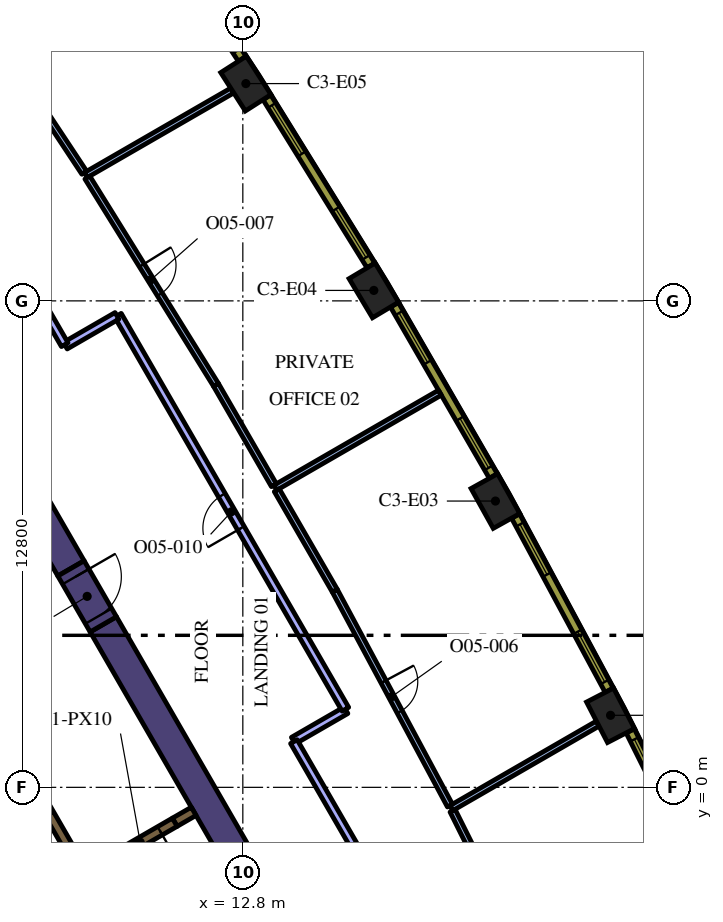
"""IFC4 building model, lengths in metres.
Left out: names, types, materials, properties, quantities, classifications, styles, units other than length and angle.
Written with IfcOpenShell. Run it as: python <this file> out.ifc"""

import sys

from ifc_helpers import new_model, si_unit, direction, frame, frame_2d, origin, origin_2d, place, context, subcontext, project, spatial, rectangle, extrude, element, fill, save


model = new_model("IFC4")
c1 = context("Model", 3, precision=1e-05, world=origin(), true_north=direction((0.0, 1.0)))
c2 = subcontext(c1, "Body", "Model", "MODEL_VIEW")
j1 = project(units=[si_unit("LENGTHUNIT", "METRE"), si_unit("PLANEANGLEUNIT", "RADIAN")], contexts=[c1])
p1 = place(None, origin())
s1 = spatial("IfcSite", under=j1, at=p1, CompositionType="ELEMENT")
p2 = place(p1, origin())
s2 = spatial("IfcBuilding", under=s1, at=p2, CompositionType="ELEMENT")
p3 = place(p2, frame((0.0, 0.0, 192.0)))
s3 = spatial("IfcBuildingStorey", under=s2, at=p3, CompositionType="ELEMENT", Elevation=192.0)
for number, where, z_axis, x_axis in (
    (1, (22.476, 1.896, 0.0), (0.0, 0.0, 1.0), (-0.46, 0.888, 0.0)),
    (2, (19.447, 7.533, 0.0), (0.0, 0.0, 1.0), (-0.487, 0.874, 0.0)),
    (3, (16.247, 13.075, 0.0), (0.0, 0.0, 1.0), (-0.513, 0.858, 0.0)),
    (4, (12.88, 18.517, 0.0), (0.0, 0.0, 1.0), (-0.539, 0.842, 0.0)),
):
    element("IfcColumn", number, at=place(p3, frame(where, z_axis=z_axis, x_axis=x_axis)), inside=s3, PredefinedType="COLUMN", context=c2, shape_type="SweptSolid", body=[
        extrude(rectangle(XDim=1.2, YDim=0.8, at=origin_2d()), origin(), (0.0, 0.0, 1.0), 4.2),
    ])
p4 = place(p3, frame((9.129, 4.289, 0.0), z_axis=(0.0, 0.0, 1.0), x_axis=(0.499995742806, -0.866027861663, 0.0)))
e5 = element("IfcWall", 5, at=p4, inside=s3, PredefinedType="SOLIDWALL", context=c2, shape_type="SweptSolid", body=[
    extrude(rectangle(XDim=12.527, YDim=0.8, at=frame_2d((6.264, 0.0))), origin(), (0.0, 0.0, 1.0), 4.2),
])
p5 = place(p3, frame((8.279, 5.761, 0.0), z_axis=(0.0, 0.0, 1.0), x_axis=(-0.500010359015, 0.866019422922, 0.0)))
e6 = element("IfcWall", 6, at=p5, inside=s3, PredefinedType="SOLIDWALL", context=c2, shape_type="SweptSolid", body=[
    extrude(rectangle(XDim=12.528, YDim=0.8, at=frame_2d((6.264, 0.0))), origin(), (0.0, 0.0, 1.0), 4.2),
])
p6 = place(p3, frame((11.507, -0.631, 0.0), z_axis=(0.0, 0.0, 1.0), x_axis=(-0.866093731455, -0.499881634324, 0.0)))
e7 = element("IfcWall", 7, at=p6, inside=s3, PredefinedType="SOLIDWALL", context=c2, shape_type="SweptSolid", body=[
    extrude(rectangle(XDim=0.575, YDim=0.25, at=frame_2d((0.288, 0.0))), origin(), (0.0, 0.0, 1.0), 4.2),
])
p7 = place(p3, frame((8.565, -2.185, 0.0), z_axis=(0.0, 0.0, 1.0), x_axis=(-0.499997954832, 0.866026584559, 0.0)))
e8 = element("IfcWall", 8, at=p7, inside=s3, PredefinedType="SOLIDWALL", context=c2, shape_type="SweptSolid", body=[
    extrude(rectangle(XDim=12.35, YDim=0.25, at=frame_2d((6.175, 0.0))), origin(), (0.0, 0.0, 1.0), 4.2),
])
p8 = place(p7, frame((0.585, 0.0, 0.0)))
e9 = element("IfcOpeningElement", 9, at=p8, cuts=e8, PredefinedType="OPENING", context=c2, shape_type="SweptSolid", body=[
    extrude(rectangle(XDim=1.1, YDim=2.1, at=frame_2d((0.55, 1.05))), frame((0.0, 0.135, 0.0), z_axis=(0.0, -1.0, 0.0), x_axis=(1.0, 0.0, 0.0)), (0.0, 0.0, 1.0), 0.27),
])
p9 = place(p3, frame((11.009, -0.919, 0.0), z_axis=(0.0, 0.0, 1.0), x_axis=(-0.866059744384, -0.49994051562, 0.0)))
e10 = element("IfcWall", 10, at=p9, inside=s3, PredefinedType="SOLIDWALL", context=c2, shape_type="SweptSolid", body=[
    extrude(rectangle(XDim=2.1, YDim=0.25, at=frame_2d((1.05, 0.0))), origin(), (0.0, 0.0, 1.0), 4.2),
])
p10 = place(p9, frame((0.45, 0.0, 0.0)))
e11 = element("IfcOpeningElement", 11, at=p10, cuts=e10, PredefinedType="OPENING", context=c2, shape_type="SweptSolid", body=[
    extrude(rectangle(XDim=1.2, YDim=2.1, at=frame_2d((0.6, 1.05))), frame((0.0, 0.135, 0.0), z_axis=(0.0, -1.0, 0.0), x_axis=(1.0, 0.0, 0.0)), (0.0, 0.0, 1.0), 0.27),
])
p11 = place(p3, frame((8.279, 5.761, 0.0), z_axis=(0.0, 0.0, 1.0), x_axis=(0.500062241894, -0.865989465428, 0.0)))
e12 = element("IfcWall", 12, at=p11, inside=s3, PredefinedType="SOLIDWALL", context=c2, shape_type="SweptSolid", body=[
    extrude(rectangle(XDim=1.7, YDim=0.8, at=frame_2d((0.85, 0.0))), origin(), (0.0, 0.0, 1.0), 4.2),
])
p12 = place(p11, frame((0.25, 0.0, 0.0)))
e13 = element("IfcOpeningElement", 13, at=p12, cuts=e12, PredefinedType="OPENING", context=c2, shape_type="SweptSolid", body=[
    extrude(rectangle(XDim=1.2, YDim=2.1, at=frame_2d((0.6, 1.05))), frame((0.0, 0.41, 0.0), z_axis=(0.0, -1.0, 0.0), x_axis=(1.0, 0.0, 0.0)), (0.0, 0.0, 1.0), 0.82),
])
p13 = place(p3, frame((18.286, -0.547, 0.0), z_axis=(0.0, 0.0, 1.0), x_axis=(0.866043033223, 0.499969463673, 0.0)))
e14 = element("IfcWall", 14, at=p13, inside=s3, PredefinedType="PARTITIONING", context=c2, shape_type="SweptSolid", body=[
    extrude(rectangle(XDim=4.449, YDim=0.15, at=frame_2d((2.225, 0.0))), origin(), (0.0, 0.0, 1.0), 3.1),
])
p14 = place(p3, frame((18.32, -0.615, 0.0), z_axis=(0.0, 0.0, 1.0), x_axis=(0.446258864447, -0.894903919928, 0.0)))
e15 = element("IfcWall", 15, at=p14, inside=s3, PredefinedType="PARTITIONING", context=c2, shape_type="SweptSolid", body=[
    extrude(rectangle(XDim=5.934, YDim=0.15, at=frame_2d((2.967, 0.0))), origin(), (0.0, 0.0, 1.0), 3.1),
])
p15 = place(p14, frame((2.534, 0.0, 0.0)))
e16 = element("IfcOpeningElement", 16, at=p15, cuts=e15, PredefinedType="OPENING", context=c2, shape_type="SweptSolid", body=[
    extrude(rectangle(XDim=0.9, YDim=2.1, at=frame_2d((0.45, 1.05))), frame((0.0, 0.085, 0.0), z_axis=(0.0, -1.0, 0.0), x_axis=(1.0, 0.0, 0.0)), (0.0, 0.0, 1.0), 0.17),
])
p16 = place(p3, frame((13.656, 7.884, 0.0), z_axis=(0.0, 0.0, 1.0), x_axis=(0.866022959057, 0.500004234368, 0.0)))
e17 = element("IfcWall", 17, at=p16, inside=s3, PredefinedType="PARTITIONING", context=c2, shape_type="SweptSolid", body=[
    extrude(rectangle(XDim=5.0, YDim=0.15, at=frame_2d((2.5, 0.0))), origin(), (0.0, 0.0, 1.0), 3.1),
])
p17 = place(p3, frame((15.219, 5.177, 0.0), z_axis=(0.0, 0.0, 1.0), x_axis=(0.472318506028, -0.881427948765, 0.0)))
e18 = element("IfcWall", 18, at=p17, inside=s3, PredefinedType="PARTITIONING", context=c2, shape_type="SweptSolid", body=[
    extrude(rectangle(XDim=6.419, YDim=0.15, at=frame_2d((3.21, 0.0))), origin(), (0.0, 0.0, 1.0), 3.1),
])
p18 = place(p17, frame((2.719, 0.0, 0.0)))
e19 = element("IfcOpeningElement", 19, at=p18, cuts=e18, PredefinedType="OPENING", context=c2, shape_type="SweptSolid", body=[
    extrude(rectangle(XDim=0.9, YDim=2.1, at=frame_2d((0.45, 1.05))), frame((0.0, 0.085, 0.0), z_axis=(0.0, -1.0, 0.0), x_axis=(1.0, 0.0, 0.0)), (0.0, 0.0, 1.0), 0.17),
])
p19 = place(p3, frame((15.219, 5.177, 0.0), z_axis=(0.0, 0.0, 1.0), x_axis=(-0.500054937028, 0.865993683553, 0.0)))
e20 = element("IfcWall", 20, at=p19, inside=s3, PredefinedType="PARTITIONING", context=c2, shape_type="SweptSolid", body=[
    extrude(rectangle(XDim=3.051, YDim=0.15, at=frame_2d((1.525, 0.0))), origin(), (0.0, 0.0, 1.0), 3.1),
])
p20 = place(p3, frame((8.669, 16.11, 0.0), z_axis=(0.0, 0.0, 1.0), x_axis=(0.866019272134, 0.50001062018, 0.0)))
e21 = element("IfcWall", 21, at=p20, inside=s3, PredefinedType="PARTITIONING", context=c2, shape_type="SweptSolid", body=[
    extrude(rectangle(XDim=4.449, YDim=0.15, at=frame_2d((2.225, 0.0))), origin(), (0.0, 0.0, 1.0), 3.1),
])
p21 = place(p3, frame((13.618, 7.949, 0.0), z_axis=(0.0, 0.0, 1.0), x_axis=(-0.499994921628, 0.866028335764, 0.0)))
e22 = element("IfcWall", 22, at=p21, inside=s3, PredefinedType="PARTITIONING", context=c2, shape_type="SweptSolid", body=[
    extrude(rectangle(XDim=3.051, YDim=0.15, at=frame_2d((1.525, 0.0))), origin(), (0.0, 0.0, 1.0), 3.1),
])
p22 = place(p3, frame((8.708, 16.046, 0.0), z_axis=(0.0, 0.0, 1.0), x_axis=(0.527179193015, -0.849754140003, 0.0)))
e23 = element("IfcWall", 23, at=p22, inside=s3, PredefinedType="PARTITIONING", context=c2, shape_type="SweptSolid", body=[
    extrude(rectangle(XDim=6.42, YDim=0.15, at=frame_2d((3.21, 0.0))), origin(), (0.0, 0.0, 1.0), 3.1),
])
p23 = place(p22, frame((2.719, 0.0, 0.0)))
e24 = element("IfcOpeningElement", 24, at=p23, cuts=e23, PredefinedType="OPENING", context=c2, shape_type="SweptSolid", body=[
    extrude(rectangle(XDim=0.9, YDim=2.1, at=frame_2d((0.45, 1.05))), frame((0.0, 0.085, 0.0), z_axis=(0.0, -1.0, 0.0), x_axis=(1.0, 0.0, 0.0)), (0.0, 0.0, 1.0), 0.17),
])
p24 = place(p3, frame((5.352, 21.121, 0.0), z_axis=(0.0, 0.0, 1.0), x_axis=(0.551896352686, -0.833912714792, 0.0)))
e25 = element("IfcWall", 25, at=p24, inside=s3, PredefinedType="PARTITIONING", context=c2, shape_type="SweptSolid", body=[
    extrude(rectangle(XDim=5.934, YDim=0.15, at=frame_2d((2.967, 0.0))), origin(), (0.0, 0.0, 1.0), 3.1),
])
p25 = place(p24, frame((2.534, 0.0, 0.0)))
e26 = element("IfcOpeningElement", 26, at=p25, cuts=e25, PredefinedType="OPENING", context=c2, shape_type="SweptSolid", body=[
    extrude(rectangle(XDim=0.9, YDim=2.1, at=frame_2d((0.45, 1.05))), frame((0.0, 0.085, 0.0), z_axis=(0.0, -1.0, 0.0), x_axis=(1.0, 0.0, 0.0)), (0.0, 0.0, 1.0), 0.17),
])
p26 = place(p3, frame((14.128, 1.229, 0.0), z_axis=(0.0, 0.0, 1.0), x_axis=(0.866028054938, 0.499995408039, 0.0)))
e27 = element("IfcWall", 27, at=p26, inside=s3, PredefinedType="PARTITIONING", context=c2, shape_type="SweptSolid", body=[
    extrude(rectangle(XDim=1.6, YDim=0.2, at=frame_2d((0.8, 0.0))), origin(), (0.0, 0.0, 1.0), 3.1),
])
p27 = place(p3, frame((15.499, 2.055, 0.0), z_axis=(0.0, 0.0, 1.0), x_axis=(-0.499986694938, 0.866033085329, 0.0)))
e28 = element("IfcWall", 28, at=p27, inside=s3, PredefinedType="PARTITIONING", context=c2, shape_type="SweptSolid", body=[
    extrude(rectangle(XDim=11.97, YDim=0.2, at=frame_2d((5.985, 0.0))), origin(), (0.0, 0.0, 1.0), 3.1),
])
p28 = place(p27, frame((5.5, 0.0, 0.0)))
e29 = element("IfcOpeningElement", 29, at=p28, cuts=e28, PredefinedType="OPENING", context=c2, shape_type="SweptSolid", body=[
    extrude(rectangle(XDim=1.0, YDim=2.1, at=frame_2d((0.5, 1.05))), frame((0.0, 0.11, 0.0), z_axis=(0.0, -1.0, 0.0), x_axis=(1.0, 0.0, 0.0)), (0.0, 0.0, 1.0), 0.22),
])
p29 = place(p3, frame((9.488, 12.406, 0.0), z_axis=(0.0, 0.0, 1.0), x_axis=(-0.865975818674, -0.500085874098, 0.0)))
e30 = element("IfcWall", 30, at=p29, inside=s3, PredefinedType="PARTITIONING", context=c2, shape_type="SweptSolid", body=[
    extrude(rectangle(XDim=1.57, YDim=0.2, at=frame_2d((0.785, 0.0))), origin(), (0.0, 0.0, 1.0), 3.1),
])
p30 = place(p3, frame((8.113, 11.647, 0.0), z_axis=(0.0, 0.0, 1.0), x_axis=(-0.500001933108, 0.866024287701, 0.0)))
e31 = element("IfcWall", 31, at=p30, inside=s3, PredefinedType="PARTITIONING", context=c2, shape_type="SweptSolid", body=[
    extrude(rectangle(XDim=8.721, YDim=0.2, at=frame_2d((4.361, 0.0))), origin(), (0.0, 0.0, 1.0), 3.1),
])
p31 = place(p3, frame((18.489, -6.324, 0.0), z_axis=(0.0, 0.0, 1.0), x_axis=(-0.500006134913, 0.866021861762, 0.0)))
e32 = element("IfcWall", 32, at=p31, inside=s3, PredefinedType="PARTITIONING", context=c2, shape_type="SweptSolid", body=[
    extrude(rectangle(XDim=8.691, YDim=0.2, at=frame_2d((4.346, 0.0))), origin(), (0.0, 0.0, 1.0), 3.1),
])
p32 = place(p3, frame((25.316, -3.171, 0.0), z_axis=(0.0, 0.0, 1.0), x_axis=(-0.446256171312, 0.8949052629, 0.0)))
e33 = element("IfcWall", 33, at=p32, inside=s3, PredefinedType="SOLIDWALL", context=c2, shape_type="SweptSolid", body=[
    extrude(rectangle(XDim=5.203, YDim=0.24, at=frame_2d((2.602, 0.0))), origin(), (0.0, 0.0, 1.0), 3.9),
])
p33 = place(p32, frame((0.248, 0.0, 0.9)))
e34 = element("IfcOpeningElement", 34, at=p33, cuts=e33, PredefinedType="OPENING", context=c2, shape_type="SweptSolid", body=[
    extrude(rectangle(XDim=1.5, YDim=2.55, at=frame_2d((0.75, 1.275))), frame((0.0, 0.13, 0.0), z_axis=(0.0, -1.0, 0.0), x_axis=(1.0, 0.0, 0.0)), (0.0, 0.0, 1.0), 0.26),
])
p34 = place(p32, frame((3.455, 0.0, 0.9)))
e35 = element("IfcOpeningElement", 35, at=p34, cuts=e33, PredefinedType="OPENING", context=c2, shape_type="SweptSolid", body=[
    extrude(rectangle(XDim=1.5, YDim=2.55, at=frame_2d((0.75, 1.275))), frame((0.0, 0.13, 0.0), z_axis=(0.0, -1.0, 0.0), x_axis=(1.0, 0.0, 0.0)), (0.0, 0.0, 1.0), 0.26),
])
p35 = place(p3, frame((22.44, 2.555, 0.0), z_axis=(0.0, 0.0, 1.0), x_axis=(-0.473349833294, 0.880874528704, 0.0)))
e36 = element("IfcWall", 36, at=p35, inside=s3, PredefinedType="SOLIDWALL", context=c2, shape_type="SweptSolid", body=[
    extrude(rectangle(XDim=5.204, YDim=0.24, at=frame_2d((2.602, 0.0))), origin(), (0.0, 0.0, 1.0), 3.9),
])
p36 = place(p35, frame((0.248, 0.0, 0.9)))
e37 = element("IfcOpeningElement", 37, at=p36, cuts=e36, PredefinedType="OPENING", context=c2, shape_type="SweptSolid", body=[
    extrude(rectangle(XDim=1.5, YDim=2.55, at=frame_2d((0.75, 1.275))), frame((0.0, 0.13, 0.0), z_axis=(0.0, -1.0, 0.0), x_axis=(1.0, 0.0, 0.0)), (0.0, 0.0, 1.0), 0.26),
])
p37 = place(p35, frame((3.455, 0.0, 0.9)))
e38 = element("IfcOpeningElement", 38, at=p37, cuts=e36, PredefinedType="OPENING", context=c2, shape_type="SweptSolid", body=[
    extrude(rectangle(XDim=1.5, YDim=2.55, at=frame_2d((0.75, 1.275))), frame((0.0, 0.13, 0.0), z_axis=(0.0, -1.0, 0.0), x_axis=(1.0, 0.0, 0.0)), (0.0, 0.0, 1.0), 0.26),
])
p38 = place(p3, frame((19.391, 8.191, 0.0), z_axis=(0.0, 0.0, 1.0), x_axis=(-0.500009456303, 0.866019944116, 0.0)))
e39 = element("IfcWall", 39, at=p38, inside=s3, PredefinedType="SOLIDWALL", context=c2, shape_type="SweptSolid", body=[
    extrude(rectangle(XDim=5.204, YDim=0.24, at=frame_2d((2.602, 0.0))), origin(), (0.0, 0.0, 1.0), 3.9),
])
p39 = place(p38, frame((0.248, 0.0, 0.9)))
e40 = element("IfcOpeningElement", 40, at=p39, cuts=e39, PredefinedType="OPENING", context=c2, shape_type="SweptSolid", body=[
    extrude(rectangle(XDim=1.5, YDim=2.55, at=frame_2d((0.75, 1.275))), frame((0.0, 0.13, 0.0), z_axis=(0.0, -1.0, 0.0), x_axis=(1.0, 0.0, 0.0)), (0.0, 0.0, 1.0), 0.26),
])
p40 = place(p38, frame((3.455, 0.0, 0.9)))
e41 = element("IfcOpeningElement", 41, at=p40, cuts=e39, PredefinedType="OPENING", context=c2, shape_type="SweptSolid", body=[
    extrude(rectangle(XDim=1.5, YDim=2.55, at=frame_2d((0.75, 1.275))), frame((0.0, 0.13, 0.0), z_axis=(0.0, -1.0, 0.0), x_axis=(1.0, 0.0, 0.0)), (0.0, 0.0, 1.0), 0.26),
])
p41 = place(p3, frame((16.171, 13.731, 0.0), z_axis=(0.0, 0.0, 1.0), x_axis=(-0.526197926587, 0.850362124072, 0.0)))
e42 = element("IfcWall", 42, at=p41, inside=s3, PredefinedType="SOLIDWALL", context=c2, shape_type="SweptSolid", body=[
    extrude(rectangle(XDim=5.203, YDim=0.24, at=frame_2d((2.602, 0.0))), origin(), (0.0, 0.0, 1.0), 3.9),
])
p42 = place(p41, frame((0.248, 0.0, 0.9)))
e43 = element("IfcOpeningElement", 43, at=p42, cuts=e42, PredefinedType="OPENING", context=c2, shape_type="SweptSolid", body=[
    extrude(rectangle(XDim=1.5, YDim=2.55, at=frame_2d((0.75, 1.275))), frame((0.0, 0.13, 0.0), z_axis=(0.0, -1.0, 0.0), x_axis=(1.0, 0.0, 0.0)), (0.0, 0.0, 1.0), 0.26),
])
p43 = place(p41, frame((3.455, 0.0, 0.9)))
e44 = element("IfcOpeningElement", 44, at=p43, cuts=e42, PredefinedType="OPENING", context=c2, shape_type="SweptSolid", body=[
    extrude(rectangle(XDim=1.5, YDim=2.55, at=frame_2d((0.75, 1.275))), frame((0.0, 0.13, 0.0), z_axis=(0.0, -1.0, 0.0), x_axis=(1.0, 0.0, 0.0)), (0.0, 0.0, 1.0), 0.26),
])
p44 = place(p3, frame((12.783, 19.171, 0.0), z_axis=(0.0, 0.0, 1.0), x_axis=(-0.551892811511, 0.833915058386, 0.0)))
e45 = element("IfcWall", 45, at=p44, inside=s3, PredefinedType="SOLIDWALL", context=c2, shape_type="SweptSolid", body=[
    extrude(rectangle(XDim=5.204, YDim=0.24, at=frame_2d((2.602, 0.0))), origin(), (0.0, 0.0, 1.0), 3.9),
])
p45 = place(p44, frame((0.248, 0.0, 0.9)))
e46 = element("IfcOpeningElement", 46, at=p45, cuts=e45, PredefinedType="OPENING", context=c2, shape_type="SweptSolid", body=[
    extrude(rectangle(XDim=1.5, YDim=2.55, at=frame_2d((0.75, 1.275))), frame((0.0, 0.13, 0.0), z_axis=(0.0, -1.0, 0.0), x_axis=(1.0, 0.0, 0.0)), (0.0, 0.0, 1.0), 0.26),
])
p46 = place(p44, frame((3.455, 0.0, 0.9)))
e47 = element("IfcOpeningElement", 47, at=p46, cuts=e45, PredefinedType="OPENING", context=c2, shape_type="SweptSolid", body=[
    extrude(rectangle(XDim=1.5, YDim=2.55, at=frame_2d((0.75, 1.275))), frame((0.0, 0.13, 0.0), z_axis=(0.0, -1.0, 0.0), x_axis=(1.0, 0.0, 0.0)), (0.0, 0.0, 1.0), 0.26),
])
p47 = place(p8, origin())
e48 = element("IfcDoor", 48, at=p47, inside=s3, OperationType="DOUBLE_DOOR_SLIDING", PredefinedType="DOOR", context=c2, shape_type="SweptSolid", body=[
    extrude(rectangle(XDim=1.1, YDim=2.1, at=frame_2d((0.55, 1.05))), frame((0.0, 0.025, 0.0), z_axis=(0.0, -1.0, 0.0), x_axis=(1.0, 0.0, 0.0)), (0.0, 0.0, 1.0), 0.05),
])
fill(e9, e48)
p48 = place(p10, origin())
e49 = element("IfcDoor", 49, at=p48, inside=s3, OperationType="SINGLE_SWING_LEFT", PredefinedType="DOOR", context=c2, shape_type="SweptSolid", body=[
    extrude(rectangle(XDim=1.2, YDim=2.1, at=frame_2d((0.6, 1.05))), frame((0.0, 0.025, 0.0), z_axis=(0.0, -1.0, 0.0), x_axis=(1.0, 0.0, 0.0)), (0.0, 0.0, 1.0), 0.05),
])
fill(e11, e49)
p49 = place(p12, origin())
e50 = element("IfcDoor", 50, at=p49, inside=s3, OperationType="SINGLE_SWING_LEFT", PredefinedType="DOOR", context=c2, shape_type="SweptSolid", body=[
    extrude(rectangle(XDim=1.2, YDim=2.1, at=frame_2d((0.6, 1.05))), frame((0.0, 0.025, 0.0), z_axis=(0.0, -1.0, 0.0), x_axis=(1.0, 0.0, 0.0)), (0.0, 0.0, 1.0), 0.05),
])
fill(e13, e50)
p50 = place(p18, origin())
e51 = element("IfcDoor", 51, at=p50, inside=s3, OperationType="SINGLE_SWING_LEFT", PredefinedType="DOOR", context=c2, shape_type="SweptSolid", body=[
    extrude(rectangle(XDim=0.9, YDim=2.1, at=frame_2d((0.45, 1.05))), frame((0.0, 0.025, 0.0), z_axis=(0.0, -1.0, 0.0), x_axis=(1.0, 0.0, 0.0)), (0.0, 0.0, 1.0), 0.05),
])
fill(e19, e51)
p51 = place(p23, origin())
e52 = element("IfcDoor", 52, at=p51, inside=s3, OperationType="SINGLE_SWING_LEFT", PredefinedType="DOOR", context=c2, shape_type="SweptSolid", body=[
    extrude(rectangle(XDim=0.9, YDim=2.1, at=frame_2d((0.45, 1.05))), frame((0.0, 0.025, 0.0), z_axis=(0.0, -1.0, 0.0), x_axis=(1.0, 0.0, 0.0)), (0.0, 0.0, 1.0), 0.05),
])
fill(e24, e52)
p52 = place(p28, origin())
e53 = element("IfcDoor", 53, at=p52, inside=s3, OperationType="SINGLE_SWING_RIGHT", PredefinedType="DOOR", context=c2, shape_type="SweptSolid", body=[
    extrude(rectangle(XDim=1.0, YDim=2.1, at=frame_2d((0.5, 1.05))), frame((0.0, 0.025, 0.0), z_axis=(0.0, -1.0, 0.0), x_axis=(1.0, 0.0, 0.0)), (0.0, 0.0, 1.0), 0.05),
])
fill(e29, e53)
p53 = place(p34, origin())
e54 = element("IfcWindow", 54, at=p53, inside=s3, PartitioningType="SINGLE_PANEL", PredefinedType="WINDOW", context=c2, shape_type="SweptSolid", body=[
    extrude(rectangle(XDim=1.5, YDim=2.55, at=frame_2d((0.75, 1.275))), frame((0.0, 0.04, 0.0), z_axis=(0.0, -1.0, 0.0), x_axis=(1.0, 0.0, 0.0)), (0.0, 0.0, 1.0), 0.06),
])
fill(e35, e54)
p54 = place(p36, origin())
e55 = element("IfcWindow", 55, at=p54, inside=s3, PartitioningType="SINGLE_PANEL", PredefinedType="WINDOW", context=c2, shape_type="SweptSolid", body=[
    extrude(rectangle(XDim=1.5, YDim=2.55, at=frame_2d((0.75, 1.275))), frame((0.0, 0.04, 0.0), z_axis=(0.0, -1.0, 0.0), x_axis=(1.0, 0.0, 0.0)), (0.0, 0.0, 1.0), 0.06),
])
fill(e37, e55)
p55 = place(p37, origin())
e56 = element("IfcWindow", 56, at=p55, inside=s3, PartitioningType="SINGLE_PANEL", PredefinedType="WINDOW", context=c2, shape_type="SweptSolid", body=[
    extrude(rectangle(XDim=1.5, YDim=2.55, at=frame_2d((0.75, 1.275))), frame((0.0, 0.04, 0.0), z_axis=(0.0, -1.0, 0.0), x_axis=(1.0, 0.0, 0.0)), (0.0, 0.0, 1.0), 0.06),
])
fill(e38, e56)
p56 = place(p39, origin())
e57 = element("IfcWindow", 57, at=p56, inside=s3, PartitioningType="SINGLE_PANEL", PredefinedType="WINDOW", context=c2, shape_type="SweptSolid", body=[
    extrude(rectangle(XDim=1.5, YDim=2.55, at=frame_2d((0.75, 1.275))), frame((0.0, 0.04, 0.0), z_axis=(0.0, -1.0, 0.0), x_axis=(1.0, 0.0, 0.0)), (0.0, 0.0, 1.0), 0.06),
])
fill(e40, e57)
p57 = place(p40, origin())
e58 = element("IfcWindow", 58, at=p57, inside=s3, PartitioningType="SINGLE_PANEL", PredefinedType="WINDOW", context=c2, shape_type="SweptSolid", body=[
    extrude(rectangle(XDim=1.5, YDim=2.55, at=frame_2d((0.75, 1.275))), frame((0.0, 0.04, 0.0), z_axis=(0.0, -1.0, 0.0), x_axis=(1.0, 0.0, 0.0)), (0.0, 0.0, 1.0), 0.06),
])
fill(e41, e58)
p58 = place(p42, origin())
e59 = element("IfcWindow", 59, at=p58, inside=s3, PartitioningType="SINGLE_PANEL", PredefinedType="WINDOW", context=c2, shape_type="SweptSolid", body=[
    extrude(rectangle(XDim=1.5, YDim=2.55, at=frame_2d((0.75, 1.275))), frame((0.0, 0.04, 0.0), z_axis=(0.0, -1.0, 0.0), x_axis=(1.0, 0.0, 0.0)), (0.0, 0.0, 1.0), 0.06),
])
fill(e43, e59)
p59 = place(p43, origin())
e60 = element("IfcWindow", 60, at=p59, inside=s3, PartitioningType="SINGLE_PANEL", PredefinedType="WINDOW", context=c2, shape_type="SweptSolid", body=[
    extrude(rectangle(XDim=1.5, YDim=2.55, at=frame_2d((0.75, 1.275))), frame((0.0, 0.04, 0.0), z_axis=(0.0, -1.0, 0.0), x_axis=(1.0, 0.0, 0.0)), (0.0, 0.0, 1.0), 0.06),
])
fill(e44, e60)
save(model, sys.argv[1])
